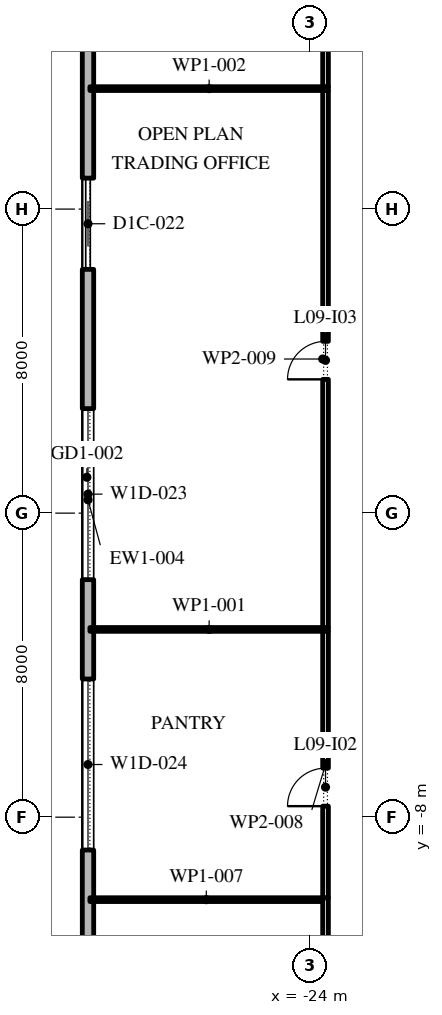
"""IFC4 building model, lengths in metres.
Left out: names, types, materials, properties, quantities, classifications, styles, units other than length and angle.
Written with IfcOpenShell. Run it as: python <this file> out.ifc"""

import sys

from ifc_helpers import new_model, si_unit, direction, frame, frame_2d, origin, place, context, subcontext, project, spatial, rectangle, extrude, element, fill, save


model = new_model("IFC4")
c1 = context("Model", 3, precision=1e-05, world=origin(), true_north=direction((0.0, 1.0)))
c2 = subcontext(c1, "Body", "Model", "MODEL_VIEW")
j1 = project(units=[si_unit("LENGTHUNIT", "METRE"), si_unit("PLANEANGLEUNIT", "RADIAN")], contexts=[c1])
p1 = place(None, origin())
s1 = spatial("IfcSite", under=j1, at=p1, CompositionType="ELEMENT")
p2 = place(p1, origin())
s2 = spatial("IfcBuilding", under=s1, at=p2, CompositionType="ELEMENT")
p3 = place(p2, frame((0.0, 0.0, 48.0)))
s3 = spatial("IfcBuildingStorey", under=s2, at=p3, CompositionType="ELEMENT", Elevation=48.0)
p4 = place(p3, frame((-29.85, 25.1, 0.0), z_axis=(0.0, 0.0, 1.0), x_axis=(0.0, -1.0, 0.0)))
e1 = element("IfcWall", 1, at=p4, inside=s3, PredefinedType="STANDARD", context=c2, shape_type="SweptSolid", body=[
    extrude(rectangle(XDim=49.5, YDim=0.3, at=frame_2d((24.75, 0.0))), origin(), (0.0, 0.0, 1.0), 4.0),
])
p5 = place(p4, frame((1.157, 0.0, 0.45)))
e2 = element("IfcOpeningElement", 2, at=p5, cuts=e1, PredefinedType="OPENING", context=c2, shape_type="SweptSolid", body=[
    extrude(rectangle(XDim=4.5, YDim=2.875, at=frame_2d((2.25, 1.438))), frame((0.0, 0.16, 0.0), z_axis=(0.0, -1.0, 0.0), x_axis=(1.0, 0.0, 0.0)), (0.0, 0.0, 1.0), 0.32),
])
p6 = place(p4, frame((8.121, 0.0, 0.45)))
e3 = element("IfcOpeningElement", 3, at=p6, cuts=e1, PredefinedType="OPENING", context=c2, shape_type="SweptSolid", body=[
    extrude(rectangle(XDim=4.5, YDim=3.05, at=frame_2d((2.25, 1.525))), frame((0.0, 0.16, 0.0), z_axis=(0.0, -1.0, 0.0), x_axis=(1.0, 0.0, 0.0)), (0.0, 0.0, 1.0), 0.32),
])
p7 = place(p4, frame((16.286, 0.0, 0.0)))
e4 = element("IfcOpeningElement", 4, at=p7, cuts=e1, PredefinedType="OPENING", context=c2, shape_type="SweptSolid", body=[
    extrude(rectangle(XDim=2.4, YDim=3.325, at=frame_2d((1.2, 1.663))), frame((0.0, 0.16, 0.0), z_axis=(0.0, -1.0, 0.0), x_axis=(1.0, 0.0, 0.0)), (0.0, 0.0, 1.0), 0.32),
])
p8 = place(p4, frame((22.35, 0.0, 0.45)))
e5 = element("IfcOpeningElement", 5, at=p8, cuts=e1, PredefinedType="OPENING", context=c2, shape_type="SweptSolid", body=[
    extrude(rectangle(XDim=4.5, YDim=2.875, at=frame_2d((2.25, 1.438))), frame((0.0, 0.16, 0.0), z_axis=(0.0, -1.0, 0.0), x_axis=(1.0, 0.0, 0.0)), (0.0, 0.0, 1.0), 0.32),
])
p9 = place(p4, frame((29.464, 0.0, 0.45)))
e6 = element("IfcOpeningElement", 6, at=p9, cuts=e1, PredefinedType="OPENING", context=c2, shape_type="SweptSolid", body=[
    extrude(rectangle(XDim=4.5, YDim=2.875, at=frame_2d((2.25, 1.438))), frame((0.0, 0.16, 0.0), z_axis=(0.0, -1.0, 0.0), x_axis=(1.0, 0.0, 0.0)), (0.0, 0.0, 1.0), 0.32),
])
p10 = place(p4, frame((36.579, 0.0, 0.45)))
e7 = element("IfcOpeningElement", 7, at=p10, cuts=e1, PredefinedType="OPENING", context=c2, shape_type="SweptSolid", body=[
    extrude(rectangle(XDim=4.5, YDim=2.825, at=frame_2d((2.25, 1.413))), frame((0.0, 0.16, 0.0), z_axis=(0.0, -1.0, 0.0), x_axis=(1.0, 0.0, 0.0)), (0.0, 0.0, 1.0), 0.32),
])
p11 = place(p4, frame((44.743, 0.0, 0.0)))
e8 = element("IfcOpeningElement", 8, at=p11, cuts=e1, PredefinedType="OPENING", context=c2, shape_type="SweptSolid", body=[
    extrude(rectangle(XDim=2.4, YDim=3.5, at=frame_2d((1.2, 1.75))), frame((0.0, 0.16, 0.0), z_axis=(0.0, -1.0, 0.0), x_axis=(1.0, 0.0, 0.0)), (0.0, 0.0, 1.0), 0.32),
])
for number, where, z_axis, x_axis in (
    (9, (-29.8, -3.06, 0.0), (0.0, 0.0, 1.0), (1.0, 0.0, 0.0)),
    (10, (-29.8, 11.17, 0.0), (0.0, 0.0, 1.0), (1.0, 0.0, 0.0)),
):
    element("IfcWall", number, at=place(p3, frame(where, z_axis=z_axis, x_axis=x_axis)), inside=s3, PredefinedType="PARTITIONING", context=c2, shape_type="SweptSolid", body=[
        extrude(rectangle(XDim=6.275, YDim=0.1, at=frame_2d((3.138, 0.0))), origin(), (0.0, 0.0, 1.0), 4.0),
    ])
p12 = place(p3, frame((-23.6, -17.675, 0.0), z_axis=(0.0, 0.0, 1.0), x_axis=(0.0, 1.0, 0.0)))
e11 = element("IfcWall", 11, at=p12, inside=s3, PredefinedType="PARTITIONING", context=c2, shape_type="SweptSolid", body=[
    extrude(rectangle(XDim=7.555, YDim=0.15, at=frame_2d((3.777, 0.0))), origin(), (0.0, 0.0, 1.0), 4.0),
])
p13 = place(p3, frame((-23.675, -10.17, 0.0), z_axis=(0.0, 0.0, 1.0), x_axis=(-1.0, 0.0, 0.0)))
e12 = element("IfcWall", 12, at=p13, inside=s3, PredefinedType="PARTITIONING", context=c2, shape_type="SweptSolid", body=[
    extrude(rectangle(XDim=6.125, YDim=0.1, at=frame_2d((3.062, 0.0))), origin(), (0.0, 0.0, 1.0), 4.0),
])
p14 = place(p3, frame((-23.6, -10.12, 0.0), z_axis=(0.0, 0.0, 1.0), x_axis=(0.0, 1.0, 0.0)))
e13 = element("IfcWall", 13, at=p14, inside=s3, PredefinedType="PARTITIONING", context=c2, shape_type="SweptSolid", body=[
    extrude(rectangle(XDim=7.01, YDim=0.15, at=frame_2d((3.505, 0.0))), origin(), (0.0, 0.0, 1.0), 4.0),
])
p15 = place(p14, frame((2.41, 0.0, 0.0)))
e14 = element("IfcOpeningElement", 14, at=p15, cuts=e13, PredefinedType="OPENING", context=c2, shape_type="SweptSolid", body=[
    extrude(rectangle(XDim=1.0, YDim=2.1, at=frame_2d((0.5, 1.05))), frame((0.0, 0.085, 0.0), z_axis=(0.0, -1.0, 0.0), x_axis=(1.0, 0.0, 0.0)), (0.0, 0.0, 1.0), 0.17),
])
p16 = place(p3, frame((-23.6, -3.01, 0.0), z_axis=(0.0, 0.0, 1.0), x_axis=(0.0, 1.0, 0.0)))
e15 = element("IfcWall", 15, at=p16, inside=s3, PredefinedType="PARTITIONING", context=c2, shape_type="SweptSolid", body=[
    extrude(rectangle(XDim=14.13, YDim=0.15, at=frame_2d((7.065, 0.0))), origin(), (0.0, 0.0, 1.0), 4.0),
])
p17 = place(p16, frame((6.53, 0.0, 0.0)))
e16 = element("IfcOpeningElement", 16, at=p17, cuts=e15, PredefinedType="OPENING", context=c2, shape_type="SweptSolid", body=[
    extrude(rectangle(XDim=1.0, YDim=2.1, at=frame_2d((0.5, 1.05))), frame((0.0, 0.085, 0.0), z_axis=(0.0, -1.0, 0.0), x_axis=(1.0, 0.0, 0.0)), (0.0, 0.0, 1.0), 0.17),
])
p18 = place(p3, frame((-23.6, 11.22, 0.0), z_axis=(0.0, 0.0, 1.0), x_axis=(0.0, 1.0, 0.0)))
e17 = element("IfcWall", 17, at=p18, inside=s3, PredefinedType="PARTITIONING", context=c2, shape_type="SweptSolid", body=[
    extrude(rectangle(XDim=7.02, YDim=0.15, at=frame_2d((3.51, 0.0))), origin(), (0.0, 0.0, 1.0), 4.0),
])
p19 = place(p18, frame((4.42, 0.0, 0.0)))
e18 = element("IfcOpeningElement", 18, at=p19, cuts=e17, PredefinedType="OPENING", context=c2, shape_type="SweptSolid", body=[
    extrude(rectangle(XDim=1.0, YDim=2.1, at=frame_2d((0.5, 1.05))), frame((0.0, 0.085, 0.0), z_axis=(0.0, -1.0, 0.0), x_axis=(1.0, 0.0, 0.0)), (0.0, 0.0, 1.0), 0.17),
])
p20 = place(p7, origin())
e19 = element("IfcDoor", 19, at=p20, inside=s3, OperationType="DOUBLE_DOOR_SLIDING", PredefinedType="DOOR", context=c2, shape_type="SweptSolid", body=[
    extrude(rectangle(XDim=2.4, YDim=3.325, at=frame_2d((1.2, 1.663))), frame((0.0, 0.025, 0.0), z_axis=(0.0, -1.0, 0.0), x_axis=(1.0, 0.0, 0.0)), (0.0, 0.0, 1.0), 0.05),
])
fill(e4, e19)
p21 = place(p8, origin())
e20 = element("IfcWindow", 20, at=p21, inside=s3, PartitioningType="DOUBLE_PANEL_VERTICAL", PredefinedType="WINDOW", context=c2, shape_type="SweptSolid", body=[
    extrude(rectangle(XDim=4.5, YDim=2.875, at=frame_2d((2.25, 1.438))), frame((0.0, 0.03, 0.0), z_axis=(0.0, -1.0, 0.0), x_axis=(1.0, 0.0, 0.0)), (0.0, 0.0, 1.0), 0.06),
])
fill(e5, e20)
p22 = place(p9, origin())
e21 = element("IfcWindow", 21, at=p22, inside=s3, PartitioningType="DOUBLE_PANEL_VERTICAL", PredefinedType="WINDOW", context=c2, shape_type="SweptSolid", body=[
    extrude(rectangle(XDim=4.5, YDim=2.875, at=frame_2d((2.25, 1.438))), frame((0.0, 0.03, 0.0), z_axis=(0.0, -1.0, 0.0), x_axis=(1.0, 0.0, 0.0)), (0.0, 0.0, 1.0), 0.06),
])
fill(e6, e21)
p23 = place(p15, origin())
e22 = element("IfcDoor", 22, at=p23, inside=s3, OperationType="SINGLE_SWING_RIGHT", PredefinedType="DOOR", context=c2, shape_type="SweptSolid", body=[
    extrude(rectangle(XDim=1.0, YDim=2.1, at=frame_2d((0.5, 1.05))), frame((0.0, 0.025, 0.0), z_axis=(0.0, -1.0, 0.0), x_axis=(1.0, 0.0, 0.0)), (0.0, 0.0, 1.0), 0.05),
])
fill(e14, e22)
p24 = place(p17, origin())
e23 = element("IfcDoor", 23, at=p24, inside=s3, OperationType="SINGLE_SWING_RIGHT", PredefinedType="DOOR", context=c2, shape_type="SweptSolid", body=[
    extrude(rectangle(XDim=1.0, YDim=2.1, at=frame_2d((0.5, 1.05))), frame((0.0, 0.025, 0.0), z_axis=(0.0, -1.0, 0.0), x_axis=(1.0, 0.0, 0.0)), (0.0, 0.0, 1.0), 0.05),
])
fill(e16, e23)
save(model, sys.argv[1])
